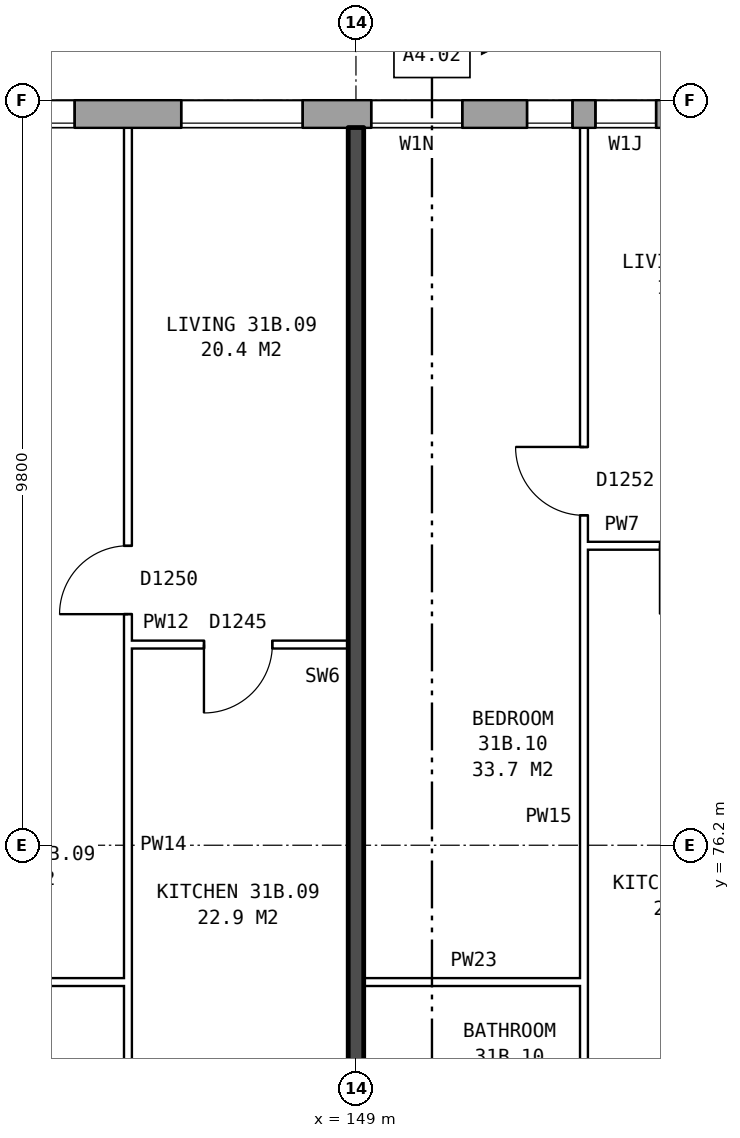
"""IFC4 building model, lengths in metres.
Left out: names, types, materials, properties, quantities, classifications, styles, units other than length and angle.
Written with IfcOpenShell. Run it as: python <this file> out.ifc"""

import sys

from ifc_helpers import new_model, si_unit, direction, frame, frame_2d, origin, place, context, subcontext, project, spatial, rectangle, extrude, element, fill, save


model = new_model("IFC4")
c1 = context("Model", 3, precision=1e-05, world=origin(), true_north=direction((0.0, 1.0)))
c2 = subcontext(c1, "Body", "Model", "MODEL_VIEW")
j1 = project(units=[si_unit("LENGTHUNIT", "METRE"), si_unit("PLANEANGLEUNIT", "RADIAN")], contexts=[c1])
p1 = place(None, origin())
s1 = spatial("IfcSite", under=j1, at=p1, CompositionType="ELEMENT")
p2 = place(p1, origin())
s2 = spatial("IfcBuilding", under=s1, at=p2, CompositionType="ELEMENT")
p3 = place(p2, frame((0.0, 0.0, 111.9)))
s3 = spatial("IfcBuildingStorey", under=s2, at=p3, CompositionType="ELEMENT", Elevation=111.9)
p4 = place(p3, frame((170.925, 85.82, 0.0), z_axis=(0.0, 0.0, 1.0), x_axis=(-1.0, 0.0, 0.0)))
e1 = element("IfcWall", 1, at=p4, inside=s3, PredefinedType="STANDARD", context=c2, shape_type="SweptSolid", body=[
    extrude(rectangle(XDim=36.851, YDim=0.36, at=frame_2d((18.425, 0.0))), origin(), (0.0, 0.0, 1.0), 2.85),
])
p5 = place(p4, frame((1.625, 0.0, 0.8)))
e2 = element("IfcOpeningElement", 2, at=p5, cuts=e1, PredefinedType="OPENING", context=c2, shape_type="SweptSolid", body=[
    extrude(rectangle(XDim=1.6, YDim=1.8, at=frame_2d((0.8, 0.9))), frame((0.0, 0.19, 0.0), z_axis=(0.0, -1.0, 0.0), x_axis=(1.0, 0.0, 0.0)), (0.0, 0.0, 1.0), 0.38),
])
p6 = place(p4, frame((4.625, 0.0, 0.8)))
e3 = element("IfcOpeningElement", 3, at=p6, cuts=e1, PredefinedType="OPENING", context=c2, shape_type="SweptSolid", body=[
    extrude(rectangle(XDim=1.6, YDim=1.8, at=frame_2d((0.8, 0.9))), frame((0.0, 0.19, 0.0), z_axis=(0.0, -1.0, 0.0), x_axis=(1.0, 0.0, 0.0)), (0.0, 0.0, 1.0), 0.38),
])
p7 = place(p4, frame((7.625, 0.0, 0.8)))
e4 = element("IfcOpeningElement", 4, at=p7, cuts=e1, PredefinedType="OPENING", context=c2, shape_type="SweptSolid", body=[
    extrude(rectangle(XDim=1.6, YDim=1.8, at=frame_2d((0.8, 0.9))), frame((0.0, 0.19, 0.0), z_axis=(0.0, -1.0, 0.0), x_axis=(1.0, 0.0, 0.0)), (0.0, 0.0, 1.0), 0.38),
])
p8 = place(p4, frame((10.625, 0.0, 0.8)))
e5 = element("IfcOpeningElement", 5, at=p8, cuts=e1, PredefinedType="OPENING", context=c2, shape_type="SweptSolid", body=[
    extrude(rectangle(XDim=1.6, YDim=1.8, at=frame_2d((0.8, 0.9))), frame((0.0, 0.19, 0.0), z_axis=(0.0, -1.0, 0.0), x_axis=(1.0, 0.0, 0.0)), (0.0, 0.0, 1.0), 0.38),
])
p9 = place(p4, frame((13.625, 0.0, 0.8)))
e6 = element("IfcOpeningElement", 6, at=p9, cuts=e1, PredefinedType="OPENING", context=c2, shape_type="SweptSolid", body=[
    extrude(rectangle(XDim=1.6, YDim=1.8, at=frame_2d((0.8, 0.9))), frame((0.0, 0.19, 0.0), z_axis=(0.0, -1.0, 0.0), x_axis=(1.0, 0.0, 0.0)), (0.0, 0.0, 1.0), 0.38),
])
p10 = place(p4, frame((17.075, 0.0, 0.15)))
e7 = element("IfcOpeningElement", 7, at=p10, cuts=e1, PredefinedType="OPENING", context=c2, shape_type="SweptSolid", body=[
    extrude(rectangle(XDim=0.6, YDim=0.9, at=frame_2d((0.3, 0.45))), frame((0.0, 0.19, 0.0), z_axis=(0.0, -1.0, 0.0), x_axis=(1.0, 0.0, 0.0)), (0.0, 0.0, 1.0), 0.38),
])
p11 = place(p4, frame((19.075, 0.0, 0.25)))
e8 = element("IfcOpeningElement", 8, at=p11, cuts=e1, PredefinedType="OPENING", context=c2, shape_type="SweptSolid", body=[
    extrude(rectangle(XDim=0.6, YDim=0.9, at=frame_2d((0.3, 0.45))), frame((0.0, 0.19, 0.0), z_axis=(0.0, -1.0, 0.0), x_axis=(1.0, 0.0, 0.0)), (0.0, 0.0, 1.0), 0.38),
])
p12 = place(p4, frame((22.625, 0.0, 0.8)))
e9 = element("IfcOpeningElement", 9, at=p12, cuts=e1, PredefinedType="OPENING", context=c2, shape_type="SweptSolid", body=[
    extrude(rectangle(XDim=1.6, YDim=1.8, at=frame_2d((0.8, 0.9))), frame((0.0, 0.19, 0.0), z_axis=(0.0, -1.0, 0.0), x_axis=(1.0, 0.0, 0.0)), (0.0, 0.0, 1.0), 0.38),
])
p13 = place(p4, frame((25.625, 0.0, 0.8)))
e10 = element("IfcOpeningElement", 10, at=p13, cuts=e1, PredefinedType="OPENING", context=c2, shape_type="SweptSolid", body=[
    extrude(rectangle(XDim=1.6, YDim=1.8, at=frame_2d((0.8, 0.9))), frame((0.0, 0.19, 0.0), z_axis=(0.0, -1.0, 0.0), x_axis=(1.0, 0.0, 0.0)), (0.0, 0.0, 1.0), 0.38),
])
p14 = place(p4, frame((28.625, 0.0, 0.8)))
e11 = element("IfcOpeningElement", 11, at=p14, cuts=e1, PredefinedType="OPENING", context=c2, shape_type="SweptSolid", body=[
    extrude(rectangle(XDim=1.6, YDim=1.8, at=frame_2d((0.8, 0.9))), frame((0.0, 0.19, 0.0), z_axis=(0.0, -1.0, 0.0), x_axis=(1.0, 0.0, 0.0)), (0.0, 0.0, 1.0), 0.38),
])
p15 = place(p4, frame((31.625, 0.0, 0.8)))
e12 = element("IfcOpeningElement", 12, at=p15, cuts=e1, PredefinedType="OPENING", context=c2, shape_type="SweptSolid", body=[
    extrude(rectangle(XDim=1.6, YDim=1.8, at=frame_2d((0.8, 0.9))), frame((0.0, 0.19, 0.0), z_axis=(0.0, -1.0, 0.0), x_axis=(1.0, 0.0, 0.0)), (0.0, 0.0, 1.0), 0.38),
])
p16 = place(p4, frame((34.625, 0.0, 0.8)))
e13 = element("IfcOpeningElement", 13, at=p16, cuts=e1, PredefinedType="OPENING", context=c2, shape_type="SweptSolid", body=[
    extrude(rectangle(XDim=1.6, YDim=1.8, at=frame_2d((0.8, 0.9))), frame((0.0, 0.19, 0.0), z_axis=(0.0, -1.0, 0.0), x_axis=(1.0, 0.0, 0.0)), (0.0, 0.0, 1.0), 0.38),
])
p17 = place(p4, frame((17.975, 0.0, 0.25)))
e14 = element("IfcOpeningElement", 14, at=p17, cuts=e1, PredefinedType="OPENING", context=c2, shape_type="SweptSolid", body=[
    extrude(rectangle(XDim=0.8, YDim=1.5, at=frame_2d((0.4, 0.75))), frame((0.0, 0.19, 0.0), z_axis=(0.0, -1.0, 0.0), x_axis=(1.0, 0.0, 0.0)), (0.0, 0.0, 1.0), 0.38),
])
p18 = place(p4, frame((20.525, 0.0, 1.35)))
e15 = element("IfcOpeningElement", 15, at=p18, cuts=e1, PredefinedType="OPENING", context=c2, shape_type="SweptSolid", body=[
    extrude(rectangle(XDim=1.2, YDim=1.2, at=frame_2d((0.6, 0.6))), frame((0.0, 0.19, 0.0), z_axis=(0.0, -1.0, 0.0), x_axis=(1.0, 0.0, 0.0)), (0.0, 0.0, 1.0), 0.38),
])
p19 = place(p3, frame((142.76, 74.4, 0.0), z_axis=(0.0, 0.0, 1.0), x_axis=(1.0, 0.0, 0.0)))
e16 = element("IfcWall", 16, at=p19, inside=s3, PredefinedType="PARTITIONING", context=c2, shape_type="SweptSolid", body=[
    extrude(rectangle(XDim=3.24, YDim=0.1, at=frame_2d((1.62, 0.0))), origin(), (0.0, 0.0, 1.0), 2.85),
])
p20 = place(p3, frame((149.1, 74.4, 0.0), z_axis=(0.0, 0.0, 1.0), x_axis=(1.0, 0.0, 0.0)))
e17 = element("IfcWall", 17, at=p20, inside=s3, PredefinedType="PARTITIONING", context=c2, shape_type="SweptSolid", body=[
    extrude(rectangle(XDim=2.9, YDim=0.1, at=frame_2d((1.45, 0.0))), origin(), (0.0, 0.0, 1.0), 2.85),
])
p21 = place(p3, frame((146.0, 78.84, 0.0), z_axis=(0.0, 0.0, 1.0), x_axis=(1.0, 0.0, 0.0)))
e18 = element("IfcWall", 18, at=p21, inside=s3, PredefinedType="PARTITIONING", context=c2, shape_type="SweptSolid", body=[
    extrude(rectangle(XDim=2.9, YDim=0.1, at=frame_2d((1.45, 0.0))), origin(), (0.0, 0.0, 1.0), 2.85),
])
p22 = place(p21, frame((1.0, 0.0, 0.0)))
e19 = element("IfcOpeningElement", 19, at=p22, cuts=e18, PredefinedType="OPENING", context=c2, shape_type="SweptSolid", body=[
    extrude(rectangle(XDim=0.9, YDim=2.1, at=frame_2d((0.45, 1.05))), frame((0.0, 0.06, 0.0), z_axis=(0.0, -1.0, 0.0), x_axis=(1.0, 0.0, 0.0)), (0.0, 0.0, 1.0), 0.12),
])
p23 = place(p3, frame((152.0, 80.14, 0.0), z_axis=(0.0, 0.0, 1.0), x_axis=(1.0, 0.0, 0.0)))
e20 = element("IfcWall", 20, at=p23, inside=s3, PredefinedType="PARTITIONING", context=c2, shape_type="SweptSolid", body=[
    extrude(rectangle(XDim=2.9, YDim=0.1, at=frame_2d((1.45, 0.0))), origin(), (0.0, 0.0, 1.0), 2.85),
])
p24 = place(p23, frame((1.0, 0.0, 0.0)))
e21 = element("IfcOpeningElement", 21, at=p24, cuts=e20, PredefinedType="OPENING", context=c2, shape_type="SweptSolid", body=[
    extrude(rectangle(XDim=0.9, YDim=2.1, at=frame_2d((0.45, 1.05))), frame((0.0, 0.06, 0.0), z_axis=(0.0, -1.0, 0.0), x_axis=(1.0, 0.0, 0.0)), (0.0, 0.0, 1.0), 0.12),
])
p25 = place(p3, frame((146.0, 71.3, 0.0), z_axis=(0.0, 0.0, 1.0), x_axis=(0.0, 1.0, 0.0)))
e22 = element("IfcWall", 22, at=p25, inside=s3, PredefinedType="PARTITIONING", context=c2, shape_type="SweptSolid", body=[
    extrude(rectangle(XDim=14.34, YDim=0.1, at=frame_2d((7.17, 0.0))), origin(), (0.0, 0.0, 1.0), 2.85),
])
p26 = place(p25, frame((7.94, 0.0, 0.0)))
e23 = element("IfcOpeningElement", 23, at=p26, cuts=e22, PredefinedType="OPENING", context=c2, shape_type="SweptSolid", body=[
    extrude(rectangle(XDim=0.9, YDim=2.1, at=frame_2d((0.45, 1.05))), frame((0.0, 0.06, 0.0), z_axis=(0.0, -1.0, 0.0), x_axis=(1.0, 0.0, 0.0)), (0.0, 0.0, 1.0), 0.12),
])
p27 = place(p25, frame((0.4, 0.0, 0.0)))
e24 = element("IfcOpeningElement", 24, at=p27, cuts=e22, PredefinedType="OPENING", context=c2, shape_type="SweptSolid", body=[
    extrude(rectangle(XDim=0.9, YDim=2.1, at=frame_2d((0.45, 1.05))), frame((0.0, 0.06, 0.0), z_axis=(0.0, -1.0, 0.0), x_axis=(1.0, 0.0, 0.0)), (0.0, 0.0, 1.0), 0.12),
])
p28 = place(p3, frame((149.0, 71.2, 0.0), z_axis=(0.0, 0.0, 1.0), x_axis=(0.0, 1.0, 0.0)))
e25 = element("IfcWall", 25, at=p28, inside=s3, PredefinedType="SOLIDWALL", context=c2, shape_type="SweptSolid", body=[
    extrude(rectangle(XDim=14.44, YDim=0.2, at=frame_2d((7.22, 0.0))), origin(), (0.0, 0.0, 1.0), 2.85),
])
p29 = place(p3, frame((152.0, 71.3, 0.0), z_axis=(0.0, 0.0, 1.0), x_axis=(0.0, 1.0, 0.0)))
e26 = element("IfcWall", 26, at=p29, inside=s3, PredefinedType="PARTITIONING", context=c2, shape_type="SweptSolid", body=[
    extrude(rectangle(XDim=14.34, YDim=0.1, at=frame_2d((7.17, 0.0))), origin(), (0.0, 0.0, 1.0), 2.85),
])
p30 = place(p29, frame((9.24, 0.0, 0.0)))
e27 = element("IfcOpeningElement", 27, at=p30, cuts=e26, PredefinedType="OPENING", context=c2, shape_type="SweptSolid", body=[
    extrude(rectangle(XDim=0.9, YDim=2.1, at=frame_2d((0.45, 1.05))), frame((0.0, 0.06, 0.0), z_axis=(0.0, -1.0, 0.0), x_axis=(1.0, 0.0, 0.0)), (0.0, 0.0, 1.0), 0.12),
])
p31 = place(p29, frame((0.4, 0.0, 0.0)))
e28 = element("IfcOpeningElement", 28, at=p31, cuts=e26, PredefinedType="OPENING", context=c2, shape_type="SweptSolid", body=[
    extrude(rectangle(XDim=0.9, YDim=2.1, at=frame_2d((0.45, 1.05))), frame((0.0, 0.06, 0.0), z_axis=(0.0, -1.0, 0.0), x_axis=(1.0, 0.0, 0.0)), (0.0, 0.0, 1.0), 0.12),
])
p32 = place(p11, origin())
e29 = element("IfcWindow", 29, at=p32, inside=s3, PartitioningType="SINGLE_PANEL", PredefinedType="WINDOW", context=c2, shape_type="SweptSolid", body=[
    extrude(rectangle(XDim=0.6, YDim=0.9, at=frame_2d((0.3, 0.45))), frame((0.0, 0.15, 0.0), z_axis=(0.0, -1.0, 0.0), x_axis=(1.0, 0.0, 0.0)), (0.0, 0.0, 1.0), 0.06),
])
fill(e8, e29)
p33 = place(p12, origin())
e30 = element("IfcWindow", 30, at=p33, inside=s3, PartitioningType="SINGLE_PANEL", PredefinedType="WINDOW", context=c2, shape_type="SweptSolid", body=[
    extrude(rectangle(XDim=1.6, YDim=1.8, at=frame_2d((0.8, 0.9))), frame((0.0, 0.15, 0.0), z_axis=(0.0, -1.0, 0.0), x_axis=(1.0, 0.0, 0.0)), (0.0, 0.0, 1.0), 0.06),
])
fill(e9, e30)
p34 = place(p13, origin())
e31 = element("IfcWindow", 31, at=p34, inside=s3, PartitioningType="SINGLE_PANEL", PredefinedType="WINDOW", context=c2, shape_type="SweptSolid", body=[
    extrude(rectangle(XDim=1.6, YDim=1.8, at=frame_2d((0.8, 0.9))), frame((0.0, 0.15, 0.0), z_axis=(0.0, -1.0, 0.0), x_axis=(1.0, 0.0, 0.0)), (0.0, 0.0, 1.0), 0.06),
])
fill(e10, e31)
p35 = place(p26, origin())
e32 = element("IfcDoor", 32, at=p35, inside=s3, OperationType="SINGLE_SWING_LEFT", PredefinedType="DOOR", context=c2, shape_type="SweptSolid", body=[
    extrude(rectangle(XDim=0.9, YDim=2.1, at=frame_2d((0.45, 1.05))), frame((0.0, 0.025, 0.0), z_axis=(0.0, -1.0, 0.0), x_axis=(1.0, 0.0, 0.0)), (0.0, 0.0, 1.0), 0.05),
])
fill(e23, e32)
p36 = place(p22, frame((0.9, 0.0, 0.0), z_axis=(0.0, 0.0, 1.0), x_axis=(-1.0, 0.0, 0.0)))
e33 = element("IfcDoor", 33, at=p36, inside=s3, OperationType="SINGLE_SWING_RIGHT", PredefinedType="DOOR", context=c2, shape_type="SweptSolid", body=[
    extrude(rectangle(XDim=0.9, YDim=2.1, at=frame_2d((0.45, 1.05))), frame((0.0, 0.025, 0.0), z_axis=(0.0, -1.0, 0.0), x_axis=(1.0, 0.0, 0.0)), (0.0, 0.0, 1.0), 0.05),
])
fill(e19, e33)
p37 = place(p30, origin())
e34 = element("IfcDoor", 34, at=p37, inside=s3, OperationType="SINGLE_SWING_RIGHT", PredefinedType="DOOR", context=c2, shape_type="SweptSolid", body=[
    extrude(rectangle(XDim=0.9, YDim=2.1, at=frame_2d((0.45, 1.05))), frame((0.0, 0.025, 0.0), z_axis=(0.0, -1.0, 0.0), x_axis=(1.0, 0.0, 0.0)), (0.0, 0.0, 1.0), 0.05),
])
fill(e27, e34)
p38 = place(p17, origin())
e35 = element("IfcWindow", 35, at=p38, inside=s3, PartitioningType="SINGLE_PANEL", PredefinedType="WINDOW", context=c2, shape_type="SweptSolid", body=[
    extrude(rectangle(XDim=0.8, YDim=1.5, at=frame_2d((0.4, 0.75))), frame((0.0, 0.15, 0.0), z_axis=(0.0, -1.0, 0.0), x_axis=(1.0, 0.0, 0.0)), (0.0, 0.0, 1.0), 0.06),
])
fill(e14, e35)
p39 = place(p18, origin())
e36 = element("IfcWindow", 36, at=p39, inside=s3, PartitioningType="SINGLE_PANEL", PredefinedType="WINDOW", context=c2, shape_type="SweptSolid", body=[
    extrude(rectangle(XDim=1.2, YDim=1.2, at=frame_2d((0.6, 0.6))), frame((0.0, 0.15, 0.0), z_axis=(0.0, -1.0, 0.0), x_axis=(1.0, 0.0, 0.0)), (0.0, 0.0, 1.0), 0.06),
])
fill(e15, e36)
save(model, sys.argv[1])
